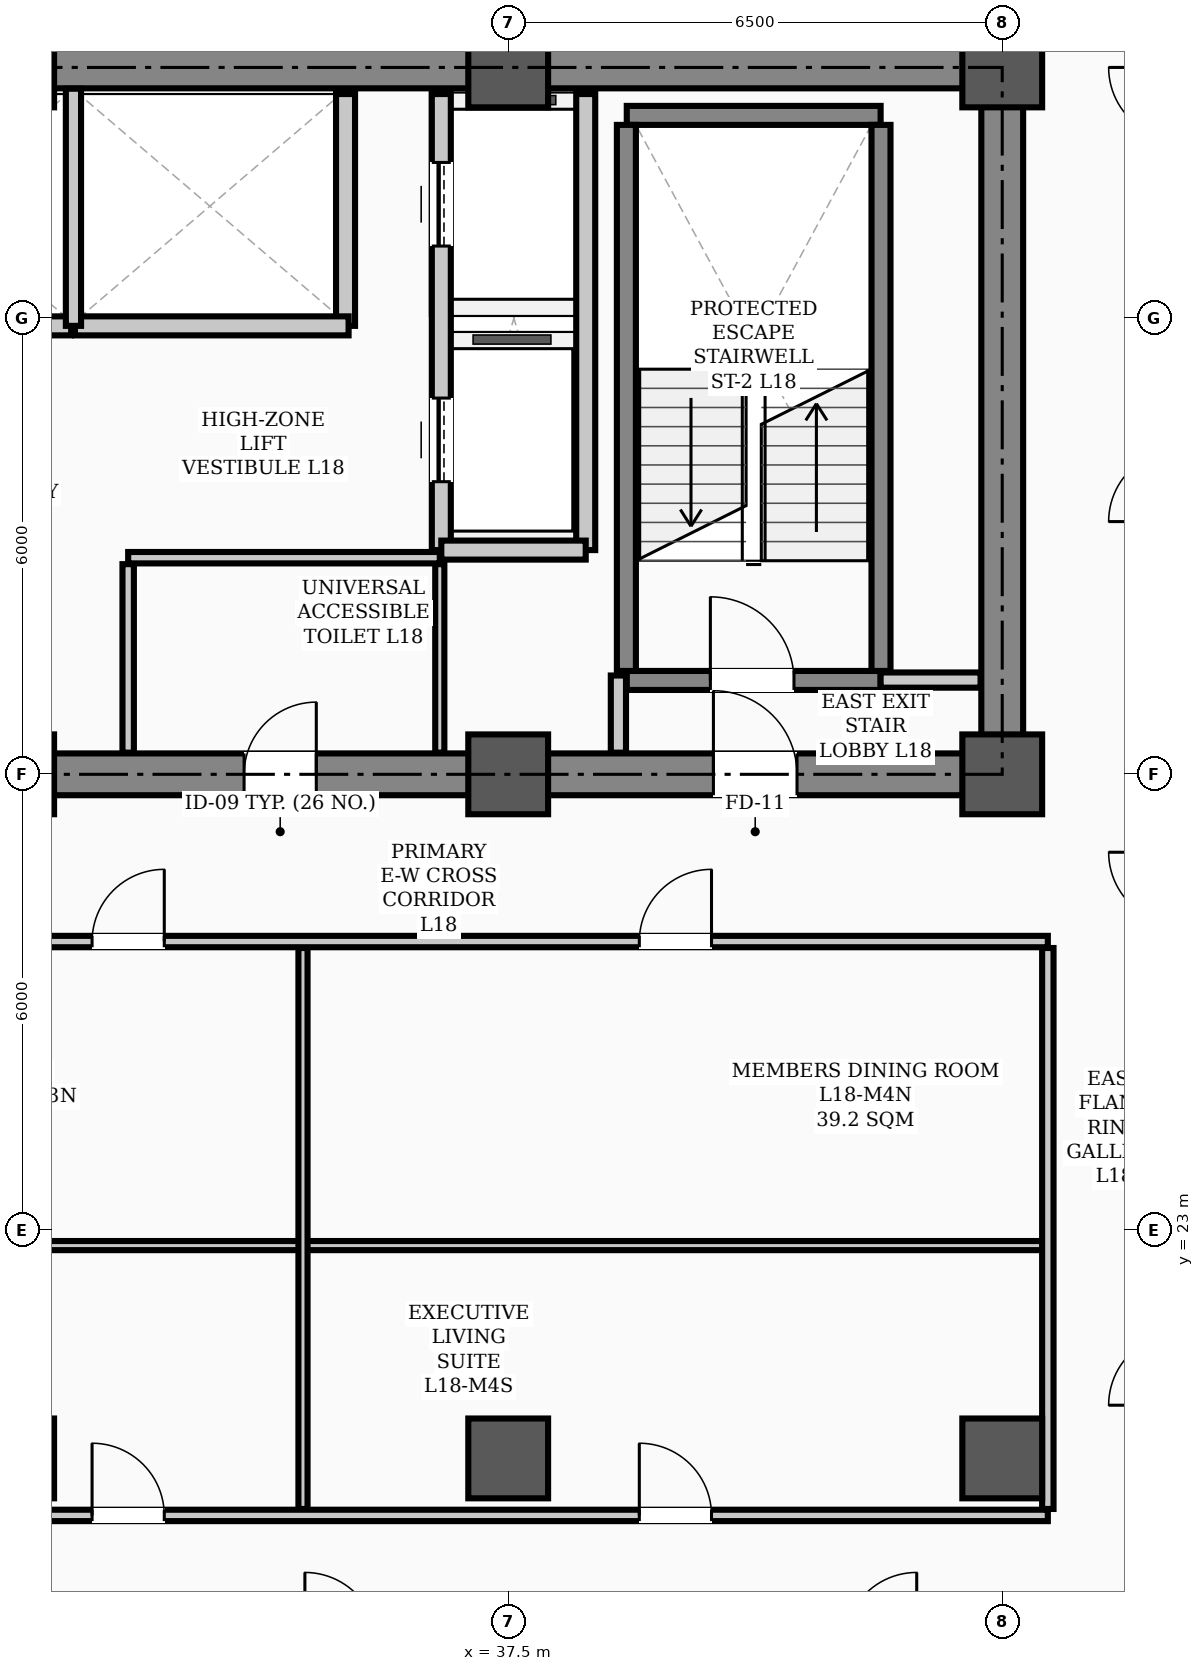
"""IFC4 building model, lengths in metres.
Left out: names, types, materials, properties, quantities, classifications, styles, units other than length and angle.
Written with IfcOpenShell. Run it as: python <this file> out.ifc"""

import sys

from ifc_helpers import new_model, si_unit, direction, frame, frame_2d, origin, origin_2d, place, context, subcontext, project, spatial, rectangle, hollow_rectangle, extrude, element, fill, save


model = new_model("IFC4")
c1 = context("Model", 3, precision=1e-05, world=origin(), true_north=direction((0.0, 1.0)))
c2 = subcontext(c1, "Body", "Model", "MODEL_VIEW")
j1 = project(units=[si_unit("LENGTHUNIT", "METRE"), si_unit("PLANEANGLEUNIT", "RADIAN")], contexts=[c1])
p1 = place(None, origin())
s1 = spatial("IfcSite", under=j1, at=p1, CompositionType="ELEMENT")
p2 = place(p1, origin())
s2 = spatial("IfcBuilding", under=s1, at=p2, CompositionType="ELEMENT")
p3 = place(p2, frame((0.0, 0.0, 73.3)))
s3 = spatial("IfcBuildingStorey", under=s2, at=p3, CompositionType="ELEMENT", Elevation=73.3)
for number, where, z_axis, x_axis in (
    (1, (31.0, 29.0, 0.0), (0.0, 0.0, 1.0), (1.0, 0.0, 0.0)),
    (2, (31.0, 38.3, 0.0), (0.0, 0.0, 1.0), (1.0, 0.0, 0.0)),
    (3, (37.5, 29.0, 0.0), (0.0, 0.0, 1.0), (1.0, 0.0, 0.0)),
    (4, (37.5, 38.3, 0.0), (0.0, 0.0, 1.0), (1.0, 0.0, 0.0)),
    (5, (44.0, 29.0, 0.0), (0.0, 0.0, 1.0), (1.0, 0.0, 0.0)),
    (6, (44.0, 38.3, 0.0), (0.0, 0.0, 1.0), (1.0, 0.0, 0.0)),
    (7, (31.0, 20.0, 0.0), (0.0, 0.0, 1.0), (1.0, 0.0, 0.0)),
    (8, (37.5, 20.0, 0.0), (0.0, 0.0, 1.0), (1.0, 0.0, 0.0)),
    (9, (44.0, 20.0, 0.0), (0.0, 0.0, 1.0), (1.0, 0.0, 0.0)),
):
    element("IfcColumn", number, at=place(p3, frame(where, z_axis=z_axis, x_axis=x_axis)), inside=s3, PredefinedType="COLUMN", context=c2, shape_type="SweptSolid", body=[
        extrude(hollow_rectangle(XDim=1.05, YDim=1.05, WallThickness=0.038, InnerFilletRadius=0.019, OuterFilletRadius=0.057, at=origin_2d()), origin(), (0.0, 0.0, 1.0), 3.9),
    ])
p4 = place(p3, frame((13.5, 29.0, 0.0), z_axis=(0.0, 0.0, 1.0), x_axis=(1.0, 0.0, 0.0)))
e10 = element("IfcWall", 10, at=p4, inside=s3, PredefinedType="SHEAR", context=c2, shape_type="SweptSolid", body=[
    extrude(rectangle(XDim=30.5, YDim=0.55, at=frame_2d((15.25, 0.0))), origin(), (0.0, 0.0, 1.0), 3.72),
])
p5 = place(p4, frame((1.75, 0.0, 0.0)))
e11 = element("IfcOpeningElement", 11, at=p5, cuts=e10, PredefinedType="OPENING", context=c2, shape_type="SweptSolid", body=[
    extrude(rectangle(XDim=1.1, YDim=2.08, at=frame_2d((0.55, 1.04))), frame((0.0, 0.285, 0.0), z_axis=(0.0, -1.0, 0.0), x_axis=(1.0, 0.0, 0.0)), (0.0, 0.0, 1.0), 0.57),
])
p6 = place(p4, frame((26.7, 0.0, 0.0)))
e12 = element("IfcOpeningElement", 12, at=p6, cuts=e10, PredefinedType="OPENING", context=c2, shape_type="SweptSolid", body=[
    extrude(rectangle(XDim=1.1, YDim=2.08, at=frame_2d((0.55, 1.04))), frame((0.0, 0.285, 0.0), z_axis=(0.0, -1.0, 0.0), x_axis=(1.0, 0.0, 0.0)), (0.0, 0.0, 1.0), 0.57),
])
p7 = place(p4, frame((6.8, 0.0, 0.0)))
e13 = element("IfcOpeningElement", 13, at=p7, cuts=e10, PredefinedType="OPENING", context=c2, shape_type="SweptSolid", body=[
    extrude(rectangle(XDim=1.1, YDim=2.08, at=frame_2d((0.55, 1.04))), frame((0.0, 0.285, 0.0), z_axis=(0.0, -1.0, 0.0), x_axis=(1.0, 0.0, 0.0)), (0.0, 0.0, 1.0), 0.57),
])
p8 = place(p4, frame((13.2, 0.0, 0.0)))
e14 = element("IfcOpeningElement", 14, at=p8, cuts=e10, PredefinedType="OPENING", context=c2, shape_type="SweptSolid", body=[
    extrude(rectangle(XDim=1.6, YDim=2.08, at=frame_2d((0.8, 1.04))), frame((0.0, 0.285, 0.0), z_axis=(0.0, -1.0, 0.0), x_axis=(1.0, 0.0, 0.0)), (0.0, 0.0, 1.0), 0.57),
])
p9 = place(p4, frame((20.525, 0.0, 0.0)))
e15 = element("IfcOpeningElement", 15, at=p9, cuts=e10, PredefinedType="OPENING", context=c2, shape_type="SweptSolid", body=[
    extrude(rectangle(XDim=0.95, YDim=2.08, at=frame_2d((0.475, 1.04))), frame((0.0, 0.285, 0.0), z_axis=(0.0, -1.0, 0.0), x_axis=(1.0, 0.0, 0.0)), (0.0, 0.0, 1.0), 0.57),
])
p10 = place(p3, frame((13.5, 38.3, 0.0), z_axis=(0.0, 0.0, 1.0), x_axis=(1.0, 0.0, 0.0)))
e16 = element("IfcWall", 16, at=p10, inside=s3, PredefinedType="SHEAR", context=c2, shape_type="SweptSolid", body=[
    extrude(rectangle(XDim=30.5, YDim=0.55, at=frame_2d((15.25, 0.0))), origin(), (0.0, 0.0, 1.0), 3.72),
])
p11 = place(p3, frame((44.0, 29.35, 0.0), z_axis=(0.0, 0.0, 1.0), x_axis=(0.0, 1.0, 0.0)))
e17 = element("IfcWall", 17, at=p11, inside=s3, PredefinedType="SHEAR", context=c2, shape_type="SweptSolid", body=[
    extrude(rectangle(XDim=8.6, YDim=0.55, at=frame_2d((4.3, 0.0))), origin(), (0.0, 0.0, 1.0), 3.72),
])
p12 = place(p3, frame((39.06, 30.235, 0.0), z_axis=(0.0, 0.0, 1.0), x_axis=(1.0, 0.0, 0.0)))
e18 = element("IfcWall", 18, at=p12, inside=s3, PredefinedType="STANDARD", context=c2, shape_type="SweptSolid", body=[
    extrude(rectangle(XDim=3.34, YDim=0.25, at=frame_2d((1.67, 0.0))), origin(), (0.0, 0.0, 1.0), 3.72),
])
p13 = place(p12, frame((1.1, 0.0, 0.0)))
e19 = element("IfcOpeningElement", 19, at=p13, cuts=e18, PredefinedType="OPENING", context=c2, shape_type="SweptSolid", body=[
    extrude(rectangle(XDim=1.1, YDim=2.08, at=frame_2d((0.55, 1.04))), frame((0.0, 0.135, 0.0), z_axis=(0.0, -1.0, 0.0), x_axis=(1.0, 0.0, 0.0)), (0.0, 0.0, 1.0), 0.27),
])
p14 = place(p3, frame((39.06, 37.669, 0.0), z_axis=(0.0, 0.0, 1.0), x_axis=(1.0, 0.0, 0.0)))
e20 = element("IfcWall", 20, at=p14, inside=s3, PredefinedType="STANDARD", context=c2, shape_type="SweptSolid", body=[
    extrude(rectangle(XDim=3.34, YDim=0.25, at=frame_2d((1.67, 0.0))), origin(), (0.0, 0.0, 1.0), 3.72),
])
for number, where, z_axis, x_axis in (
    (21, (39.055, 30.36, 0.0), (0.0, 0.0, 1.0), (0.0, 1.0, 0.0)),
    (22, (42.405, 30.36, 0.0), (0.0, 0.0, 1.0), (0.0, 1.0, 0.0)),
):
    element("IfcWall", number, at=place(p3, frame(where, z_axis=z_axis, x_axis=x_axis)), inside=s3, PredefinedType="STANDARD", context=c2, shape_type="SweptSolid", body=[
        extrude(rectangle(XDim=7.184, YDim=0.25, at=frame_2d((3.592, 0.0))), origin(), (0.0, 0.0, 1.0), 3.72),
    ])
p15 = place(p3, frame((36.62, 31.95, 0.0), z_axis=(0.0, 0.0, 1.0), x_axis=(0.0, 1.0, 0.0)))
e23 = element("IfcWall", 23, at=p15, inside=s3, PredefinedType="STANDARD", context=c2, shape_type="SweptSolid", body=[
    extrude(rectangle(XDim=6.0, YDim=0.25, at=frame_2d((3.0, 0.0))), origin(), (0.0, 0.0, 1.0), 3.3),
])
p16 = place(p15, frame((0.9, 0.0, 0.0)))
e24 = element("IfcOpeningElement", 24, at=p16, cuts=e23, PredefinedType="OPENING", context=c2, shape_type="SweptSolid", body=[
    extrude(rectangle(XDim=1.1, YDim=2.08, at=frame_2d((0.55, 1.04))), frame((0.0, 0.135, 0.0), z_axis=(0.0, -1.0, 0.0), x_axis=(1.0, 0.0, 0.0)), (0.0, 0.0, 1.0), 0.27),
])
p17 = place(p15, frame((4.0, 0.0, 0.0)))
e25 = element("IfcOpeningElement", 25, at=p17, cuts=e23, PredefinedType="OPENING", context=c2, shape_type="SweptSolid", body=[
    extrude(rectangle(XDim=1.1, YDim=2.08, at=frame_2d((0.55, 1.04))), frame((0.0, 0.135, 0.0), z_axis=(0.0, -1.0, 0.0), x_axis=(1.0, 0.0, 0.0)), (0.0, 0.0, 1.0), 0.27),
])
p18 = place(p3, frame((38.52, 31.95, 0.0), z_axis=(0.0, 0.0, 1.0), x_axis=(0.0, 1.0, 0.0)))
e26 = element("IfcWall", 26, at=p18, inside=s3, PredefinedType="STANDARD", context=c2, shape_type="SweptSolid", body=[
    extrude(rectangle(XDim=6.0, YDim=0.25, at=frame_2d((3.0, 0.0))), origin(), (0.0, 0.0, 1.0), 3.3),
])
p19 = place(p3, frame((36.62, 31.95, 0.0), z_axis=(0.0, 0.0, 1.0), x_axis=(1.0, 0.0, 0.0)))
e27 = element("IfcWall", 27, at=p19, inside=s3, PredefinedType="STANDARD", context=c2, shape_type="SweptSolid", body=[
    extrude(rectangle(XDim=1.9, YDim=0.25, at=frame_2d((0.95, 0.0))), origin(), (0.0, 0.0, 1.0), 3.48),
])
p20 = place(p3, frame((35.36, 34.9, 0.0), z_axis=(0.0, 0.0, 1.0), x_axis=(0.0, 1.0, 0.0)))
e28 = element("IfcWall", 28, at=p20, inside=s3, PredefinedType="STANDARD", context=c2, shape_type="SweptSolid", body=[
    extrude(rectangle(XDim=3.05, YDim=0.25, at=frame_2d((1.525, 0.0))), origin(), (0.0, 0.0, 1.0), 3.3),
])
p21 = place(p3, frame((28.2, 34.9, 0.0), z_axis=(0.0, 0.0, 1.0), x_axis=(1.0, 0.0, 0.0)))
e29 = element("IfcWall", 29, at=p21, inside=s3, PredefinedType="STANDARD", context=c2, shape_type="SweptSolid", body=[
    extrude(rectangle(XDim=3.55, YDim=0.25, at=frame_2d((1.775, 0.0))), origin(), (0.0, 0.0, 1.0), 3.72),
])
p22 = place(p3, frame((31.8, 34.9, 0.0), z_axis=(0.0, 0.0, 1.0), x_axis=(1.0, 0.0, 0.0)))
e30 = element("IfcWall", 30, at=p22, inside=s3, PredefinedType="STANDARD", context=c2, shape_type="SweptSolid", body=[
    extrude(rectangle(XDim=3.6, YDim=0.25, at=frame_2d((1.8, 0.0))), origin(), (0.0, 0.0, 1.0), 3.72),
])
p23 = place(p3, frame((42.4, 30.24, 0.0), z_axis=(0.0, 0.0, 1.0), x_axis=(1.0, 0.0, 0.0)))
e31 = element("IfcWall", 31, at=p23, inside=s3, PredefinedType="STANDARD", context=c2, shape_type="SweptSolid", body=[
    extrude(rectangle(XDim=1.315, YDim=0.2, at=frame_2d((0.658, 0.0))), origin(), (0.0, 0.0, 1.0), 3.1),
])
p24 = place(p3, frame((32.5, 31.85, 0.0), z_axis=(0.0, 0.0, 1.0), x_axis=(1.0, 0.0, 0.0)))
e32 = element("IfcWall", 32, at=p24, inside=s3, PredefinedType="PARTITIONING", context=c2, shape_type="SweptSolid", body=[
    extrude(rectangle(XDim=4.1, YDim=0.15, at=frame_2d((2.05, 0.0))), origin(), (0.0, 0.0, 1.0), 3.72),
])
p25 = place(p3, frame((12.9, 26.8, 0.0), z_axis=(0.0, 0.0, 1.0), x_axis=(1.0, 0.0, 0.0)))
e33 = element("IfcWall", 33, at=p25, inside=s3, PredefinedType="PARTITIONING", context=c2, shape_type="SweptSolid", body=[
    extrude(rectangle(XDim=31.7, YDim=0.15, at=frame_2d((15.85, 0.0))), origin(), (0.0, 0.0, 1.0), 3.1),
])
p26 = place(p25, frame((13.6, 0.0, 0.0)))
e34 = element("IfcOpeningElement", 34, at=p26, cuts=e33, PredefinedType="OPENING", context=c2, shape_type="SweptSolid", body=[
    extrude(rectangle(XDim=1.6, YDim=2.08, at=frame_2d((0.8, 1.04))), frame((0.0, 0.085, 0.0), z_axis=(0.0, -1.0, 0.0), x_axis=(1.0, 0.0, 0.0)), (0.0, 0.0, 1.0), 0.17),
])
p27 = place(p25, frame((2.475, 0.0, 0.0)))
e35 = element("IfcOpeningElement", 35, at=p27, cuts=e33, PredefinedType="OPENING", context=c2, shape_type="SweptSolid", body=[
    extrude(rectangle(XDim=0.95, YDim=2.08, at=frame_2d((0.475, 1.04))), frame((0.0, 0.085, 0.0), z_axis=(0.0, -1.0, 0.0), x_axis=(1.0, 0.0, 0.0)), (0.0, 0.0, 1.0), 0.17),
])
p28 = place(p25, frame((9.125, 0.0, 0.0)))
e36 = element("IfcOpeningElement", 36, at=p28, cuts=e33, PredefinedType="OPENING", context=c2, shape_type="SweptSolid", body=[
    extrude(rectangle(XDim=0.95, YDim=2.08, at=frame_2d((0.475, 1.04))), frame((0.0, 0.085, 0.0), z_axis=(0.0, -1.0, 0.0), x_axis=(1.0, 0.0, 0.0)), (0.0, 0.0, 1.0), 0.17),
])
p29 = place(p25, frame((19.125, 0.0, 0.0)))
e37 = element("IfcOpeningElement", 37, at=p29, cuts=e33, PredefinedType="OPENING", context=c2, shape_type="SweptSolid", body=[
    extrude(rectangle(XDim=0.95, YDim=2.08, at=frame_2d((0.475, 1.04))), frame((0.0, 0.085, 0.0), z_axis=(0.0, -1.0, 0.0), x_axis=(1.0, 0.0, 0.0)), (0.0, 0.0, 1.0), 0.17),
])
p30 = place(p25, frame((26.325, 0.0, 0.0)))
e38 = element("IfcOpeningElement", 38, at=p30, cuts=e33, PredefinedType="OPENING", context=c2, shape_type="SweptSolid", body=[
    extrude(rectangle(XDim=0.95, YDim=2.08, at=frame_2d((0.475, 1.04))), frame((0.0, 0.085, 0.0), z_axis=(0.0, -1.0, 0.0), x_axis=(1.0, 0.0, 0.0)), (0.0, 0.0, 1.0), 0.17),
])
p31 = place(p3, frame((28.4, 19.25, 0.0), z_axis=(0.0, 0.0, 1.0), x_axis=(1.0, 0.0, 0.0)))
e39 = element("IfcWall", 39, at=p31, inside=s3, PredefinedType="PARTITIONING", context=c2, shape_type="SweptSolid", body=[
    extrude(rectangle(XDim=16.2, YDim=0.15, at=frame_2d((8.1, 0.0))), origin(), (0.0, 0.0, 1.0), 3.1),
])
p32 = place(p31, frame((3.625, 0.0, 0.0)))
e40 = element("IfcOpeningElement", 40, at=p32, cuts=e39, PredefinedType="OPENING", context=c2, shape_type="SweptSolid", body=[
    extrude(rectangle(XDim=0.95, YDim=2.08, at=frame_2d((0.475, 1.04))), frame((0.0, 0.085, 0.0), z_axis=(0.0, -1.0, 0.0), x_axis=(1.0, 0.0, 0.0)), (0.0, 0.0, 1.0), 0.17),
])
p33 = place(p31, frame((10.825, 0.0, 0.0)))
e41 = element("IfcOpeningElement", 41, at=p33, cuts=e39, PredefinedType="OPENING", context=c2, shape_type="SweptSolid", body=[
    extrude(rectangle(XDim=0.95, YDim=2.08, at=frame_2d((0.475, 1.04))), frame((0.0, 0.085, 0.0), z_axis=(0.0, -1.0, 0.0), x_axis=(1.0, 0.0, 0.0)), (0.0, 0.0, 1.0), 0.17),
])
p34 = place(p3, frame((28.4, 22.8, 0.0), z_axis=(0.0, 0.0, 1.0), x_axis=(1.0, 0.0, 0.0)))
e42 = element("IfcWall", 42, at=p34, inside=s3, PredefinedType="PARTITIONING", context=c2, shape_type="SweptSolid", body=[
    extrude(rectangle(XDim=6.4, YDim=0.12, at=frame_2d((3.2, 0.0))), origin(), (0.0, 0.0, 1.0), 3.1),
])
p35 = place(p3, frame((34.8, 22.8, 0.0), z_axis=(0.0, 0.0, 1.0), x_axis=(1.0, 0.0, 0.0)))
e43 = element("IfcWall", 43, at=p35, inside=s3, PredefinedType="PARTITIONING", context=c2, shape_type="SweptSolid", body=[
    extrude(rectangle(XDim=9.8, YDim=0.12, at=frame_2d((4.9, 0.0))), origin(), (0.0, 0.0, 1.0), 3.1),
])
p36 = place(p3, frame((38.95, 29.285, 0.0), z_axis=(0.0, 0.0, 1.0), x_axis=(0.0, 1.0, 0.0)))
e44 = element("IfcWall", 44, at=p36, inside=s3, PredefinedType="STANDARD", context=c2, shape_type="SweptSolid", body=[
    extrude(rectangle(XDim=1.015, YDim=0.2, at=frame_2d((0.508, 0.0))), origin(), (0.0, 0.0, 1.0), 3.3),
])
p37 = place(p3, frame((32.5, 29.285, 0.0), z_axis=(0.0, 0.0, 1.0), x_axis=(0.0, 1.0, 0.0)))
e45 = element("IfcWall", 45, at=p37, inside=s3, PredefinedType="PARTITIONING", context=c2, shape_type="SweptSolid", body=[
    extrude(rectangle(XDim=2.48, YDim=0.15, at=frame_2d((1.24, 0.0))), origin(), (0.0, 0.0, 1.0), 3.3),
])
p38 = place(p3, frame((36.6, 29.285, 0.0), z_axis=(0.0, 0.0, 1.0), x_axis=(0.0, 1.0, 0.0)))
e46 = element("IfcWall", 46, at=p38, inside=s3, PredefinedType="PARTITIONING", context=c2, shape_type="SweptSolid", body=[
    extrude(rectangle(XDim=2.48, YDim=0.12, at=frame_2d((1.24, 0.0))), origin(), (0.0, 0.0, 1.0), 3.3),
])
p39 = place(p3, frame((44.6, 19.335, 0.0), z_axis=(0.0, 0.0, 1.0), x_axis=(0.0, 1.0, 0.0)))
e47 = element("IfcWall", 47, at=p39, inside=s3, PredefinedType="PARTITIONING", context=c2, shape_type="SweptSolid", body=[
    extrude(rectangle(XDim=7.38, YDim=0.15, at=frame_2d((3.69, 0.0))), origin(), (0.0, 0.0, 1.0), 3.0),
])
p40 = place(p3, frame((34.8, 19.335, 0.0), z_axis=(0.0, 0.0, 1.0), x_axis=(0.0, 1.0, 0.0)))
e48 = element("IfcWall", 48, at=p40, inside=s3, PredefinedType="PARTITIONING", context=c2, shape_type="SweptSolid", body=[
    extrude(rectangle(XDim=7.38, YDim=0.12, at=frame_2d((3.69, 0.0))), origin(), (0.0, 0.0, 1.0), 3.0),
])
p41 = place(p3, frame((31.78, 34.9, 0.0), z_axis=(0.0, 0.0, 1.0), x_axis=(0.0, 1.0, 0.0)))
e49 = element("IfcWall", 49, at=p41, inside=s3, PredefinedType="STANDARD", context=c2, shape_type="SweptSolid", body=[
    extrude(rectangle(XDim=3.12, YDim=0.2, at=frame_2d((1.56, 0.0))), origin(), (0.0, 0.0, 1.0), 3.3),
])
p42 = place(p13, origin())
e50 = element("IfcDoor", 50, at=p42, inside=s3, OperationType="SINGLE_SWING_LEFT", PredefinedType="DOOR", context=c2, shape_type="SweptSolid", body=[
    extrude(rectangle(XDim=1.1, YDim=2.08, at=frame_2d((0.55, 1.04))), frame((0.0, 0.025, 0.0), z_axis=(0.0, -1.0, 0.0), x_axis=(1.0, 0.0, 0.0)), (0.0, 0.0, 1.0), 0.05),
])
fill(e19, e50)
p43 = place(p6, origin())
e51 = element("IfcDoor", 51, at=p43, inside=s3, OperationType="SINGLE_SWING_LEFT", PredefinedType="DOOR", context=c2, shape_type="SweptSolid", body=[
    extrude(rectangle(XDim=1.1, YDim=2.08, at=frame_2d((0.55, 1.04))), frame((0.0, 0.025, 0.0), z_axis=(0.0, -1.0, 0.0), x_axis=(1.0, 0.0, 0.0)), (0.0, 0.0, 1.0), 0.05),
])
fill(e12, e51)
p44 = place(p9, origin())
e52 = element("IfcDoor", 52, at=p44, inside=s3, OperationType="SINGLE_SWING_RIGHT", PredefinedType="DOOR", context=c2, shape_type="SweptSolid", body=[
    extrude(rectangle(XDim=0.95, YDim=2.08, at=frame_2d((0.475, 1.04))), frame((0.0, 0.025, 0.0), z_axis=(0.0, -1.0, 0.0), x_axis=(1.0, 0.0, 0.0)), (0.0, 0.0, 1.0), 0.05),
])
fill(e15, e52)
p45 = place(p29, origin())
e53 = element("IfcDoor", 53, at=p45, inside=s3, OperationType="SINGLE_SWING_RIGHT", PredefinedType="DOOR", context=c2, shape_type="SweptSolid", body=[
    extrude(rectangle(XDim=0.95, YDim=2.08, at=frame_2d((0.475, 1.04))), frame((0.0, 0.025, 0.0), z_axis=(0.0, -1.0, 0.0), x_axis=(1.0, 0.0, 0.0)), (0.0, 0.0, 1.0), 0.05),
])
fill(e37, e53)
p46 = place(p32, origin())
e54 = element("IfcDoor", 54, at=p46, inside=s3, OperationType="SINGLE_SWING_LEFT", PredefinedType="DOOR", context=c2, shape_type="SweptSolid", body=[
    extrude(rectangle(XDim=0.95, YDim=2.08, at=frame_2d((0.475, 1.04))), frame((0.0, 0.025, 0.0), z_axis=(0.0, -1.0, 0.0), x_axis=(1.0, 0.0, 0.0)), (0.0, 0.0, 1.0), 0.05),
])
fill(e40, e54)
p47 = place(p30, origin())
e55 = element("IfcDoor", 55, at=p47, inside=s3, OperationType="SINGLE_SWING_RIGHT", PredefinedType="DOOR", context=c2, shape_type="SweptSolid", body=[
    extrude(rectangle(XDim=0.95, YDim=2.08, at=frame_2d((0.475, 1.04))), frame((0.0, 0.025, 0.0), z_axis=(0.0, -1.0, 0.0), x_axis=(1.0, 0.0, 0.0)), (0.0, 0.0, 1.0), 0.05),
])
fill(e38, e55)
p48 = place(p33, origin())
e56 = element("IfcDoor", 56, at=p48, inside=s3, OperationType="SINGLE_SWING_LEFT", PredefinedType="DOOR", context=c2, shape_type="SweptSolid", body=[
    extrude(rectangle(XDim=0.95, YDim=2.08, at=frame_2d((0.475, 1.04))), frame((0.0, 0.025, 0.0), z_axis=(0.0, -1.0, 0.0), x_axis=(1.0, 0.0, 0.0)), (0.0, 0.0, 1.0), 0.05),
])
fill(e41, e56)
p49 = place(p16, origin())
e57 = element("IfcDoor", 57, at=p49, inside=s3, OperationType="SLIDING_TO_LEFT", PredefinedType="DOOR", context=c2, shape_type="SweptSolid", body=[
    extrude(rectangle(XDim=1.1, YDim=2.08, at=frame_2d((0.55, 1.04))), frame((0.0, 0.025, 0.0), z_axis=(0.0, -1.0, 0.0), x_axis=(1.0, 0.0, 0.0)), (0.0, 0.0, 1.0), 0.05),
])
fill(e24, e57)
p50 = place(p17, origin())
e58 = element("IfcDoor", 58, at=p50, inside=s3, OperationType="SLIDING_TO_LEFT", PredefinedType="DOOR", context=c2, shape_type="SweptSolid", body=[
    extrude(rectangle(XDim=1.1, YDim=2.08, at=frame_2d((0.55, 1.04))), frame((0.0, 0.025, 0.0), z_axis=(0.0, -1.0, 0.0), x_axis=(1.0, 0.0, 0.0)), (0.0, 0.0, 1.0), 0.05),
])
fill(e25, e58)
save(model, sys.argv[1])
